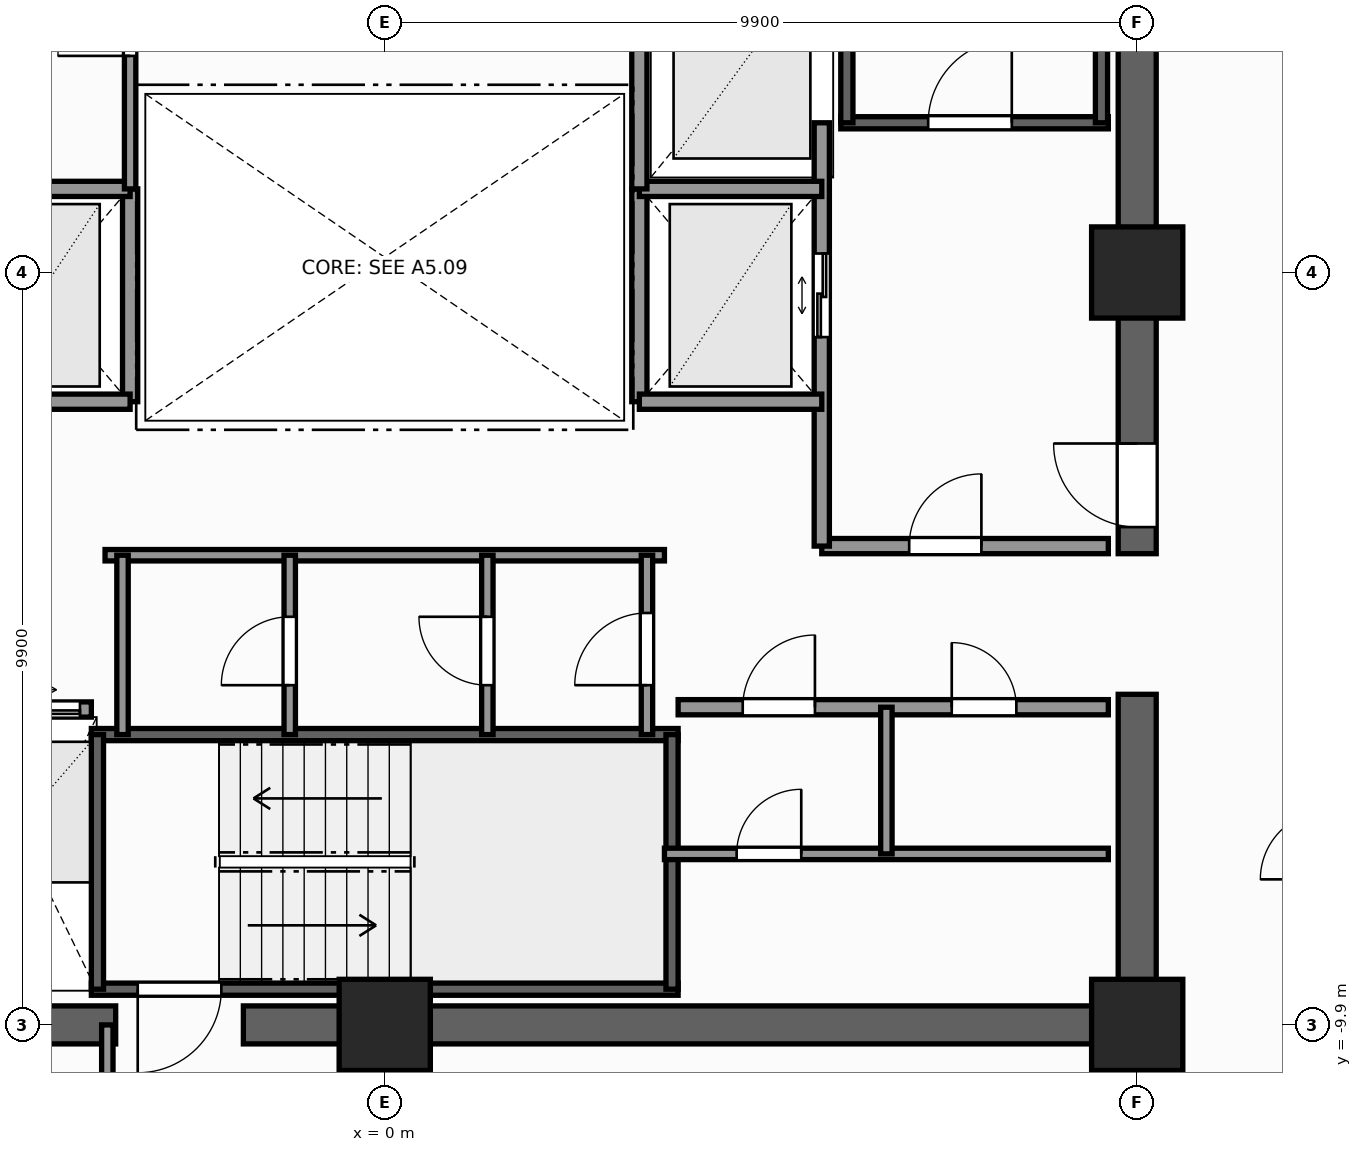
"""IFC4 building model, lengths in metres.
Left out: names, types, materials, properties, quantities, classifications, styles, units other than length and angle.
Written with IfcOpenShell. Run it as: python <this file> out.ifc"""

import sys

from ifc_helpers import new_model, si_unit, direction, frame, frame_2d, origin, origin_2d, place, context, subcontext, project, spatial, rectangle, extrude, element, fill, save


model = new_model("IFC4")
c1 = context("Model", 3, precision=1e-05, world=origin(), true_north=direction((0.0, 1.0)))
c2 = subcontext(c1, "Body", "Model", "MODEL_VIEW")
j1 = project(units=[si_unit("LENGTHUNIT", "METRE"), si_unit("PLANEANGLEUNIT", "RADIAN")], contexts=[c1])
p1 = place(None, origin())
s1 = spatial("IfcSite", under=j1, at=p1, CompositionType="ELEMENT")
p2 = place(p1, origin())
s2 = spatial("IfcBuilding", under=s1, at=p2, CompositionType="ELEMENT")
p3 = place(p2, frame((0.0, 0.0, 131.6)))
s3 = spatial("IfcBuildingStorey", under=s2, at=p3, CompositionType="ELEMENT", Elevation=131.6)
p4 = place(p3, frame((10.15, -9.9, 0.0), z_axis=(0.0, 0.0, 1.0), x_axis=(-1.0, 0.0, 0.0)))
e1 = element("IfcWall", 1, at=p4, inside=s3, PredefinedType="SHEAR", context=c2, shape_type="SweptSolid", body=[
    extrude(rectangle(XDim=12.01, YDim=0.5, at=frame_2d((6.005, 0.0))), origin(), (0.0, 0.0, 1.0), 3.3),
])
p5 = place(p3, frame((-3.54, -9.9, 0.0), z_axis=(0.0, 0.0, 1.0), x_axis=(-1.0, 0.0, 0.0)))
e2 = element("IfcWall", 2, at=p5, inside=s3, PredefinedType="SHEAR", context=c2, shape_type="SweptSolid", body=[
    extrude(rectangle(XDim=6.61, YDim=0.5, at=frame_2d((3.305, 0.0))), origin(), (0.0, 0.0, 1.0), 3.3),
])
p6 = place(p3, frame((9.9, -9.65, 0.0), z_axis=(0.0, 0.0, 1.0), x_axis=(0.0, 1.0, 0.0)))
e3 = element("IfcWall", 3, at=p6, inside=s3, PredefinedType="SHEAR", context=c2, shape_type="SweptSolid", body=[
    extrude(rectangle(XDim=4.1, YDim=0.5, at=frame_2d((2.05, 0.0))), origin(), (0.0, 0.0, 1.0), 3.3),
])
p7 = place(p3, frame((9.9, -3.7, 0.0), z_axis=(0.0, 0.0, 1.0), x_axis=(0.0, 1.0, 0.0)))
e4 = element("IfcWall", 4, at=p7, inside=s3, PredefinedType="SHEAR", context=c2, shape_type="SweptSolid", body=[
    extrude(rectangle(XDim=13.35, YDim=0.5, at=frame_2d((6.675, 0.0))), origin(), (0.0, 0.0, 1.0), 3.3),
])
p8 = place(p7, frame((0.35, 0.0, 0.0)))
e5 = element("IfcOpeningElement", 5, at=p8, cuts=e4, PredefinedType="OPENING", context=c2, shape_type="SweptSolid", body=[
    extrude(rectangle(XDim=1.1, YDim=2.2, at=frame_2d((0.55, 1.1))), frame((0.0, 0.26, 0.0), z_axis=(0.0, -1.0, 0.0), x_axis=(1.0, 0.0, 0.0)), (0.0, 0.0, 1.0), 0.52),
])
for number, where, z_axis, x_axis in (
    (6, (9.9, -9.9, 0.0), (0.0, 0.0, 1.0), (1.0, 0.0, 0.0)),
    (7, (0.0, -9.9, 0.0), (0.0, 0.0, 1.0), (1.0, 0.0, 0.0)),
    (8, (9.9, 0.0, 0.0), (0.0, 0.0, 1.0), (1.0, 0.0, 0.0)),
):
    element("IfcColumn", number, at=place(p3, frame(where, z_axis=z_axis, x_axis=x_axis)), inside=s3, PredefinedType="COLUMN", context=c2, shape_type="SweptSolid", body=[
        extrude(rectangle(XDim=1.2, YDim=1.2, at=origin_2d()), origin(), (0.0, 0.0, 1.0), 3.3),
    ])
p9 = place(p3, frame((6.0, 1.97, 0.0), z_axis=(0.0, 0.0, 1.0), x_axis=(1.0, 0.0, 0.0)))
e9 = element("IfcWall", 9, at=p9, inside=s3, PredefinedType="SHEAR", context=c2, shape_type="SweptSolid", body=[
    extrude(rectangle(XDim=3.52, YDim=0.16, at=frame_2d((1.76, 0.0))), origin(), (0.0, 0.0, 1.0), 3.3),
])
p10 = place(p9, frame((1.15, 0.0, 0.0)))
e10 = element("IfcOpeningElement", 10, at=p10, cuts=e9, PredefinedType="OPENING", context=c2, shape_type="SweptSolid", body=[
    extrude(rectangle(XDim=1.1, YDim=2.2, at=frame_2d((0.55, 1.1))), frame((0.0, 0.09, 0.0), z_axis=(0.0, -1.0, 0.0), x_axis=(1.0, 0.0, 0.0)), (0.0, 0.0, 1.0), 0.18),
])
for number, where, z_axis, x_axis in (
    (11, (6.08, 1.97, 0.0), (0.0, 0.0, 1.0), (0.0, 1.0, 0.0)),
    (12, (9.43, 1.97, 0.0), (0.0, 0.0, 1.0), (0.0, 1.0, 0.0)),
):
    element("IfcWall", number, at=place(p3, frame(where, z_axis=z_axis, x_axis=x_axis)), inside=s3, PredefinedType="SHEAR", context=c2, shape_type="SweptSolid", body=[
        extrude(rectangle(XDim=7.56, YDim=0.16, at=frame_2d((3.78, 0.0))), origin(), (0.0, 0.0, 1.0), 3.3),
    ])
p11 = place(p3, frame((3.86, -9.43, 0.0), z_axis=(0.0, 0.0, 1.0), x_axis=(-1.0, 0.0, 0.0)))
e13 = element("IfcWall", 13, at=p11, inside=s3, PredefinedType="SHEAR", context=c2, shape_type="SweptSolid", body=[
    extrude(rectangle(XDim=7.72, YDim=0.16, at=frame_2d((3.86, 0.0))), origin(), (0.0, 0.0, 1.0), 3.3),
])
p12 = place(p11, frame((6.01, 0.0, 0.0)))
e14 = element("IfcOpeningElement", 14, at=p12, cuts=e13, PredefinedType="OPENING", context=c2, shape_type="SweptSolid", body=[
    extrude(rectangle(XDim=1.1, YDim=2.2, at=frame_2d((0.55, 1.1))), frame((0.0, 0.09, 0.0), z_axis=(0.0, -1.0, 0.0), x_axis=(1.0, 0.0, 0.0)), (0.0, 0.0, 1.0), 0.18),
])
p13 = place(p3, frame((-3.86, -6.08, 0.0), z_axis=(0.0, 0.0, 1.0), x_axis=(1.0, 0.0, 0.0)))
e15 = element("IfcWall", 15, at=p13, inside=s3, PredefinedType="SHEAR", context=c2, shape_type="SweptSolid", body=[
    extrude(rectangle(XDim=7.72, YDim=0.16, at=frame_2d((3.86, 0.0))), origin(), (0.0, 0.0, 1.0), 3.3),
])
for number, where, z_axis, x_axis in (
    (16, (-3.78, -9.43, 0.0), (0.0, 0.0, 1.0), (0.0, 1.0, 0.0)),
    (17, (3.78, -9.43, 0.0), (0.0, 0.0, 1.0), (0.0, 1.0, 0.0)),
):
    element("IfcWall", number, at=place(p3, frame(where, z_axis=z_axis, x_axis=x_axis)), inside=s3, PredefinedType="SHEAR", context=c2, shape_type="SweptSolid", body=[
        extrude(rectangle(XDim=3.35, YDim=0.16, at=frame_2d((1.675, 0.0))), origin(), (0.0, 0.0, 1.0), 3.3),
    ])
p14 = place(p3, frame((-3.35, -1.7, 0.0), z_axis=(0.0, 0.0, 1.0), x_axis=(0.0, 1.0, 0.0)))
e18 = element("IfcWall", 18, at=p14, inside=s3, PredefinedType="SOLIDWALL", context=c2, shape_type="SweptSolid", body=[
    extrude(rectangle(XDim=2.8, YDim=0.2, at=frame_2d((1.4, 0.0))), origin(), (0.0, 0.0, 1.0), 2.735),
])
for number, where, z_axis, x_axis in (
    (19, (-5.75, -1.7, 0.0), (0.0, 0.0, 1.0), (1.0, 0.0, 0.0)),
    (20, (-5.75, 1.1, 0.0), (0.0, 0.0, 1.0), (1.0, 0.0, 0.0)),
):
    element("IfcWall", number, at=place(p3, frame(where, z_axis=z_axis, x_axis=x_axis)), inside=s3, PredefinedType="SOLIDWALL", context=c2, shape_type="SweptSolid", body=[
        extrude(rectangle(XDim=2.4, YDim=0.2, at=frame_2d((1.2, 0.0))), origin(), (0.0, 0.0, 1.0), 3.1),
    ])
p15 = place(p3, frame((5.75, -3.6, 0.0), z_axis=(0.0, 0.0, 1.0), x_axis=(1.0, 0.0, 0.0)))
e21 = element("IfcWall", 21, at=p15, inside=s3, PredefinedType="SOLIDWALL", context=c2, shape_type="SweptSolid", body=[
    extrude(rectangle(XDim=3.77, YDim=0.2, at=frame_2d((1.885, 0.0))), origin(), (0.0, 0.0, 1.0), 3.1),
])
p16 = place(p15, frame((1.15, 0.0, 0.0)))
e22 = element("IfcOpeningElement", 22, at=p16, cuts=e21, PredefinedType="OPENING", context=c2, shape_type="SweptSolid", body=[
    extrude(rectangle(XDim=0.95, YDim=2.06, at=frame_2d((0.475, 1.03))), frame((0.0, 0.11, 0.0), z_axis=(0.0, -1.0, 0.0), x_axis=(1.0, 0.0, 0.0)), (0.0, 0.0, 1.0), 0.22),
])
p17 = place(p3, frame((5.75, -3.6, 0.0), z_axis=(0.0, 0.0, 1.0), x_axis=(0.0, 1.0, 0.0)))
e23 = element("IfcWall", 23, at=p17, inside=s3, PredefinedType="SOLIDWALL", context=c2, shape_type="SweptSolid", body=[
    extrude(rectangle(XDim=5.57, YDim=0.2, at=frame_2d((2.785, 0.0))), origin(), (0.0, 0.0, 1.0), 2.735),
])
p18 = place(p17, frame((2.75, 0.0, 0.0)))
e24 = element("IfcOpeningElement", 24, at=p18, cuts=e23, PredefinedType="OPENING", context=c2, shape_type="SweptSolid", body=[
    extrude(rectangle(XDim=1.1, YDim=2.2, at=frame_2d((0.55, 1.1))), frame((0.0, 0.11, 0.0), z_axis=(0.0, -1.0, 0.0), x_axis=(1.0, 0.0, 0.0)), (0.0, 0.0, 1.0), 0.22),
])
p19 = place(p3, frame((3.35, -1.7, 0.0), z_axis=(0.0, 0.0, 1.0), x_axis=(0.0, 1.0, 0.0)))
e25 = element("IfcWall", 25, at=p19, inside=s3, PredefinedType="SOLIDWALL", context=c2, shape_type="SweptSolid", body=[
    extrude(rectangle(XDim=2.8, YDim=0.2, at=frame_2d((1.4, 0.0))), origin(), (0.0, 0.0, 1.0), 2.735),
])
for number, where, z_axis, x_axis in (
    (26, (3.35, -1.7, 0.0), (0.0, 0.0, 1.0), (1.0, 0.0, 0.0)),
    (27, (3.35, 1.1, 0.0), (0.0, 0.0, 1.0), (1.0, 0.0, 0.0)),
):
    element("IfcWall", number, at=place(p3, frame(where, z_axis=z_axis, x_axis=x_axis)), inside=s3, PredefinedType="SOLIDWALL", context=c2, shape_type="SweptSolid", body=[
        extrude(rectangle(XDim=2.4, YDim=0.2, at=frame_2d((1.2, 0.0))), origin(), (0.0, 0.0, 1.0), 3.1),
    ])
p20 = place(p3, frame((3.35, 1.1, 0.0), z_axis=(0.0, 0.0, 1.0), x_axis=(0.0, 1.0, 0.0)))
e28 = element("IfcWall", 28, at=p20, inside=s3, PredefinedType="SOLIDWALL", context=c2, shape_type="SweptSolid", body=[
    extrude(rectangle(XDim=3.2, YDim=0.2, at=frame_2d((1.6, 0.0))), origin(), (0.0, 0.0, 1.0), 2.735),
])
p21 = place(p3, frame((-9.52, -5.75, 0.0), z_axis=(0.0, 0.0, 1.0), x_axis=(1.0, 0.0, 0.0)))
e29 = element("IfcWall", 29, at=p21, inside=s3, PredefinedType="SOLIDWALL", context=c2, shape_type="SweptSolid", body=[
    extrude(rectangle(XDim=5.66, YDim=0.2, at=frame_2d((2.83, 0.0))), origin(), (0.0, 0.0, 1.0), 3.1),
])
p22 = place(p21, frame((0.55, 0.0, 0.0)))
e30 = element("IfcOpeningElement", 30, at=p22, cuts=e29, PredefinedType="OPENING", context=c2, shape_type="SweptSolid", body=[
    extrude(rectangle(XDim=1.1, YDim=2.2, at=frame_2d((0.55, 1.1))), frame((0.0, 0.11, 0.0), z_axis=(0.0, -1.0, 0.0), x_axis=(1.0, 0.0, 0.0)), (0.0, 0.0, 1.0), 0.22),
])
p23 = place(p21, frame((2.48, 0.0, 0.0)))
e31 = element("IfcOpeningElement", 31, at=p23, cuts=e29, PredefinedType="OPENING", context=c2, shape_type="SweptSolid", body=[
    extrude(rectangle(XDim=1.1, YDim=2.2, at=frame_2d((0.55, 1.1))), frame((0.0, 0.11, 0.0), z_axis=(0.0, -1.0, 0.0), x_axis=(1.0, 0.0, 0.0)), (0.0, 0.0, 1.0), 0.22),
])
p24 = place(p21, frame((4.41, 0.0, 0.0)))
e32 = element("IfcOpeningElement", 32, at=p24, cuts=e29, PredefinedType="OPENING", context=c2, shape_type="SweptSolid", body=[
    extrude(rectangle(XDim=1.1, YDim=2.2, at=frame_2d((0.55, 1.1))), frame((0.0, 0.11, 0.0), z_axis=(0.0, -1.0, 0.0), x_axis=(1.0, 0.0, 0.0)), (0.0, 0.0, 1.0), 0.22),
])
p25 = place(p3, frame((3.86, -5.72, 0.0), z_axis=(0.0, 0.0, 1.0), x_axis=(1.0, 0.0, 0.0)))
e33 = element("IfcWall", 33, at=p25, inside=s3, PredefinedType="SOLIDWALL", context=c2, shape_type="SweptSolid", body=[
    extrude(rectangle(XDim=5.66, YDim=0.2, at=frame_2d((2.83, 0.0))), origin(), (0.0, 0.0, 1.0), 3.1),
])
p26 = place(p25, frame((0.85, 0.0, 0.0)))
e34 = element("IfcOpeningElement", 34, at=p26, cuts=e33, PredefinedType="OPENING", context=c2, shape_type="SweptSolid", body=[
    extrude(rectangle(XDim=0.95, YDim=2.06, at=frame_2d((0.475, 1.03))), frame((0.0, 0.11, 0.0), z_axis=(0.0, -1.0, 0.0), x_axis=(1.0, 0.0, 0.0)), (0.0, 0.0, 1.0), 0.22),
])
p27 = place(p25, frame((3.6, 0.0, 0.0)))
e35 = element("IfcOpeningElement", 35, at=p27, cuts=e33, PredefinedType="OPENING", context=c2, shape_type="SweptSolid", body=[
    extrude(rectangle(XDim=0.85, YDim=2.03, at=frame_2d((0.425, 1.015))), frame((0.0, 0.11, 0.0), z_axis=(0.0, -1.0, 0.0), x_axis=(1.0, 0.0, 0.0)), (0.0, 0.0, 1.0), 0.22),
])
p28 = place(p3, frame((3.68, -7.65, 0.0), z_axis=(0.0, 0.0, 1.0), x_axis=(1.0, 0.0, 0.0)))
e36 = element("IfcWall", 36, at=p28, inside=s3, PredefinedType="PARTITIONING", context=c2, shape_type="SweptSolid", body=[
    extrude(rectangle(XDim=5.84, YDim=0.15, at=frame_2d((2.92, 0.0))), origin(), (0.0, 0.0, 1.0), 3.1),
])
p29 = place(p28, frame((0.95, 0.0, 0.0)))
e37 = element("IfcOpeningElement", 37, at=p29, cuts=e36, PredefinedType="OPENING", context=c2, shape_type="SweptSolid", body=[
    extrude(rectangle(XDim=0.85, YDim=2.03, at=frame_2d((0.425, 1.015))), frame((0.0, 0.085, 0.0), z_axis=(0.0, -1.0, 0.0), x_axis=(1.0, 0.0, 0.0)), (0.0, 0.0, 1.0), 0.17),
])
p30 = place(p3, frame((6.6, -7.65, 0.0), z_axis=(0.0, 0.0, 1.0), x_axis=(0.0, 1.0, 0.0)))
e38 = element("IfcWall", 38, at=p30, inside=s3, PredefinedType="PARTITIONING", context=c2, shape_type="SweptSolid", body=[
    extrude(rectangle(XDim=1.93, YDim=0.15, at=frame_2d((0.965, 0.0))), origin(), (0.0, 0.0, 1.0), 3.1),
])
p31 = place(p3, frame((-3.68, -3.72, 0.0), z_axis=(0.0, 0.0, 1.0), x_axis=(1.0, 0.0, 0.0)))
e39 = element("IfcWall", 39, at=p31, inside=s3, PredefinedType="PARTITIONING", context=c2, shape_type="SweptSolid", body=[
    extrude(rectangle(XDim=7.36, YDim=0.15, at=frame_2d((3.68, 0.0))), origin(), (0.0, 0.0, 1.0), 3.1),
])
p32 = place(p3, frame((3.45, -6.08, 0.0), z_axis=(0.0, 0.0, 1.0), x_axis=(0.0, 1.0, 0.0)))
e40 = element("IfcWall", 40, at=p32, inside=s3, PredefinedType="PARTITIONING", context=c2, shape_type="SweptSolid", body=[
    extrude(rectangle(XDim=2.36, YDim=0.15, at=frame_2d((1.18, 0.0))), origin(), (0.0, 0.0, 1.0), 3.1),
])
p33 = place(p32, frame((0.65, 0.0, 0.0)))
e41 = element("IfcOpeningElement", 41, at=p33, cuts=e40, PredefinedType="OPENING", context=c2, shape_type="SweptSolid", body=[
    extrude(rectangle(XDim=0.95, YDim=2.06, at=frame_2d((0.475, 1.03))), frame((0.0, 0.085, 0.0), z_axis=(0.0, -1.0, 0.0), x_axis=(1.0, 0.0, 0.0)), (0.0, 0.0, 1.0), 0.17),
])
p34 = place(p3, frame((-3.45, -6.08, 0.0), z_axis=(0.0, 0.0, 1.0), x_axis=(0.0, 1.0, 0.0)))
e42 = element("IfcWall", 42, at=p34, inside=s3, PredefinedType="PARTITIONING", context=c2, shape_type="SweptSolid", body=[
    extrude(rectangle(XDim=2.36, YDim=0.15, at=frame_2d((1.18, 0.0))), origin(), (0.0, 0.0, 1.0), 3.1),
])
p35 = place(p3, frame((1.35, -6.08, 0.0), z_axis=(0.0, 0.0, 1.0), x_axis=(0.0, 1.0, 0.0)))
e43 = element("IfcWall", 43, at=p35, inside=s3, PredefinedType="PARTITIONING", context=c2, shape_type="SweptSolid", body=[
    extrude(rectangle(XDim=2.36, YDim=0.15, at=frame_2d((1.18, 0.0))), origin(), (0.0, 0.0, 1.0), 3.1),
])
p36 = place(p35, frame((0.65, 0.0, 0.0)))
e44 = element("IfcOpeningElement", 44, at=p36, cuts=e43, PredefinedType="OPENING", context=c2, shape_type="SweptSolid", body=[
    extrude(rectangle(XDim=0.9, YDim=2.06, at=frame_2d((0.45, 1.03))), frame((0.0, 0.085, 0.0), z_axis=(0.0, -1.0, 0.0), x_axis=(1.0, 0.0, 0.0)), (0.0, 0.0, 1.0), 0.17),
])
p37 = place(p3, frame((-1.25, -6.08, 0.0), z_axis=(0.0, 0.0, 1.0), x_axis=(0.0, 1.0, 0.0)))
e45 = element("IfcWall", 45, at=p37, inside=s3, PredefinedType="PARTITIONING", context=c2, shape_type="SweptSolid", body=[
    extrude(rectangle(XDim=2.36, YDim=0.15, at=frame_2d((1.18, 0.0))), origin(), (0.0, 0.0, 1.0), 3.1),
])
p38 = place(p37, frame((0.65, 0.0, 0.0)))
e46 = element("IfcOpeningElement", 46, at=p38, cuts=e45, PredefinedType="OPENING", context=c2, shape_type="SweptSolid", body=[
    extrude(rectangle(XDim=0.9, YDim=2.06, at=frame_2d((0.45, 1.03))), frame((0.0, 0.085, 0.0), z_axis=(0.0, -1.0, 0.0), x_axis=(1.0, 0.0, 0.0)), (0.0, 0.0, 1.0), 0.17),
])
p39 = place(p3, frame((-3.35, 1.1, 0.0), z_axis=(0.0, 0.0, 1.0), x_axis=(0.0, 1.0, 0.0)))
e47 = element("IfcWall", 47, at=p39, inside=s3, PredefinedType="PARTITIONING", context=c2, shape_type="SweptSolid", body=[
    extrude(rectangle(XDim=3.2, YDim=0.15, at=frame_2d((1.6, 0.0))), origin(), (0.0, 0.0, 1.0), 2.735),
])
p40 = place(p39, frame((1.75, 0.0, 0.0)))
e48 = element("IfcOpeningElement", 48, at=p40, cuts=e47, PredefinedType="OPENING", context=c2, shape_type="SweptSolid", body=[
    extrude(rectangle(XDim=0.95, YDim=2.06, at=frame_2d((0.475, 1.03))), frame((0.0, 0.085, 0.0), z_axis=(0.0, -1.0, 0.0), x_axis=(1.0, 0.0, 0.0)), (0.0, 0.0, 1.0), 0.17),
])
p41 = place(p3, frame((-3.65, -12.58, 0.0), z_axis=(0.0, 0.0, 1.0), x_axis=(0.0, 1.0, 0.0)))
e49 = element("IfcWall", 49, at=p41, inside=s3, PredefinedType="PARTITIONING", context=c2, shape_type="SweptSolid", body=[
    extrude(rectangle(XDim=2.68, YDim=0.15, at=frame_2d((1.34, 0.0))), origin(), (0.0, 0.0, 1.0), 3.1),
])
p42 = place(p10, origin())
e50 = element("IfcDoor", 50, at=p42, inside=s3, OperationType="SINGLE_SWING_RIGHT", PredefinedType="DOOR", context=c2, shape_type="SweptSolid", body=[
    extrude(rectangle(XDim=1.1, YDim=2.2, at=frame_2d((0.55, 1.1))), frame((0.0, 0.025, 0.0), z_axis=(0.0, -1.0, 0.0), x_axis=(1.0, 0.0, 0.0)), (0.0, 0.0, 1.0), 0.05),
])
fill(e10, e50)
p43 = place(p12, origin())
e51 = element("IfcDoor", 51, at=p43, inside=s3, OperationType="SINGLE_SWING_RIGHT", PredefinedType="DOOR", context=c2, shape_type="SweptSolid", body=[
    extrude(rectangle(XDim=1.1, YDim=2.2, at=frame_2d((0.55, 1.1))), frame((0.0, 0.025, 0.0), z_axis=(0.0, -1.0, 0.0), x_axis=(1.0, 0.0, 0.0)), (0.0, 0.0, 1.0), 0.05),
])
fill(e14, e51)
p44 = place(p8, origin())
e52 = element("IfcDoor", 52, at=p44, inside=s3, OperationType="SINGLE_SWING_RIGHT", PredefinedType="DOOR", context=c2, shape_type="SweptSolid", body=[
    extrude(rectangle(XDim=1.1, YDim=2.2, at=frame_2d((0.55, 1.1))), frame((0.0, 0.025, 0.0), z_axis=(0.0, -1.0, 0.0), x_axis=(1.0, 0.0, 0.0)), (0.0, 0.0, 1.0), 0.05),
])
fill(e5, e52)
p45 = place(p18, origin())
e53 = element("IfcDoor", 53, at=p45, inside=s3, OperationType="DOUBLE_DOOR_SLIDING", PredefinedType="DOOR", context=c2, shape_type="SweptSolid", body=[
    extrude(rectangle(XDim=1.1, YDim=2.2, at=frame_2d((0.55, 1.1))), frame((0.0, 0.025, 0.0), z_axis=(0.0, -1.0, 0.0), x_axis=(1.0, 0.0, 0.0)), (0.0, 0.0, 1.0), 0.05),
])
fill(e24, e53)
p46 = place(p24, origin())
e54 = element("IfcDoor", 54, at=p46, inside=s3, OperationType="DOUBLE_DOOR_SLIDING", PredefinedType="DOOR", context=c2, shape_type="SweptSolid", body=[
    extrude(rectangle(XDim=1.1, YDim=2.2, at=frame_2d((0.55, 1.1))), frame((0.0, 0.025, 0.0), z_axis=(0.0, -1.0, 0.0), x_axis=(1.0, 0.0, 0.0)), (0.0, 0.0, 1.0), 0.05),
])
fill(e32, e54)
p47 = place(p26, origin())
e55 = element("IfcDoor", 55, at=p47, inside=s3, OperationType="SINGLE_SWING_RIGHT", PredefinedType="DOOR", context=c2, shape_type="SweptSolid", body=[
    extrude(rectangle(XDim=0.95, YDim=2.06, at=frame_2d((0.475, 1.03))), frame((0.0, 0.025, 0.0), z_axis=(0.0, -1.0, 0.0), x_axis=(1.0, 0.0, 0.0)), (0.0, 0.0, 1.0), 0.05),
])
fill(e34, e55)
p48 = place(p27, origin())
e56 = element("IfcDoor", 56, at=p48, inside=s3, OperationType="SINGLE_SWING_LEFT", PredefinedType="DOOR", context=c2, shape_type="SweptSolid", body=[
    extrude(rectangle(XDim=0.85, YDim=2.03, at=frame_2d((0.425, 1.015))), frame((0.0, 0.025, 0.0), z_axis=(0.0, -1.0, 0.0), x_axis=(1.0, 0.0, 0.0)), (0.0, 0.0, 1.0), 0.05),
])
fill(e35, e56)
p49 = place(p29, origin())
e57 = element("IfcDoor", 57, at=p49, inside=s3, OperationType="SINGLE_SWING_RIGHT", PredefinedType="DOOR", context=c2, shape_type="SweptSolid", body=[
    extrude(rectangle(XDim=0.85, YDim=2.03, at=frame_2d((0.425, 1.015))), frame((0.0, 0.025, 0.0), z_axis=(0.0, -1.0, 0.0), x_axis=(1.0, 0.0, 0.0)), (0.0, 0.0, 1.0), 0.05),
])
fill(e37, e57)
p50 = place(p16, origin())
e58 = element("IfcDoor", 58, at=p50, inside=s3, OperationType="SINGLE_SWING_RIGHT", PredefinedType="DOOR", context=c2, shape_type="SweptSolid", body=[
    extrude(rectangle(XDim=0.95, YDim=2.06, at=frame_2d((0.475, 1.03))), frame((0.0, 0.025, 0.0), z_axis=(0.0, -1.0, 0.0), x_axis=(1.0, 0.0, 0.0)), (0.0, 0.0, 1.0), 0.05),
])
fill(e22, e58)
p51 = place(p33, origin())
e59 = element("IfcDoor", 59, at=p51, inside=s3, OperationType="SINGLE_SWING_LEFT", PredefinedType="DOOR", context=c2, shape_type="SweptSolid", body=[
    extrude(rectangle(XDim=0.95, YDim=2.06, at=frame_2d((0.475, 1.03))), frame((0.0, 0.025, 0.0), z_axis=(0.0, -1.0, 0.0), x_axis=(1.0, 0.0, 0.0)), (0.0, 0.0, 1.0), 0.05),
])
fill(e41, e59)
p52 = place(p36, origin())
e60 = element("IfcDoor", 60, at=p52, inside=s3, OperationType="SINGLE_SWING_RIGHT", PredefinedType="DOOR", context=c2, shape_type="SweptSolid", body=[
    extrude(rectangle(XDim=0.9, YDim=2.06, at=frame_2d((0.45, 1.03))), frame((0.0, 0.025, 0.0), z_axis=(0.0, -1.0, 0.0), x_axis=(1.0, 0.0, 0.0)), (0.0, 0.0, 1.0), 0.05),
])
fill(e44, e60)
p53 = place(p38, origin())
e61 = element("IfcDoor", 61, at=p53, inside=s3, OperationType="SINGLE_SWING_LEFT", PredefinedType="DOOR", context=c2, shape_type="SweptSolid", body=[
    extrude(rectangle(XDim=0.9, YDim=2.06, at=frame_2d((0.45, 1.03))), frame((0.0, 0.025, 0.0), z_axis=(0.0, -1.0, 0.0), x_axis=(1.0, 0.0, 0.0)), (0.0, 0.0, 1.0), 0.05),
])
fill(e46, e61)
p54 = place(p40, origin())
e62 = element("IfcDoor", 62, at=p54, inside=s3, OperationType="SINGLE_SWING_LEFT", PredefinedType="DOOR", context=c2, shape_type="SweptSolid", body=[
    extrude(rectangle(XDim=0.95, YDim=2.06, at=frame_2d((0.475, 1.03))), frame((0.0, 0.025, 0.0), z_axis=(0.0, -1.0, 0.0), x_axis=(1.0, 0.0, 0.0)), (0.0, 0.0, 1.0), 0.05),
])
fill(e48, e62)
save(model, sys.argv[1])
